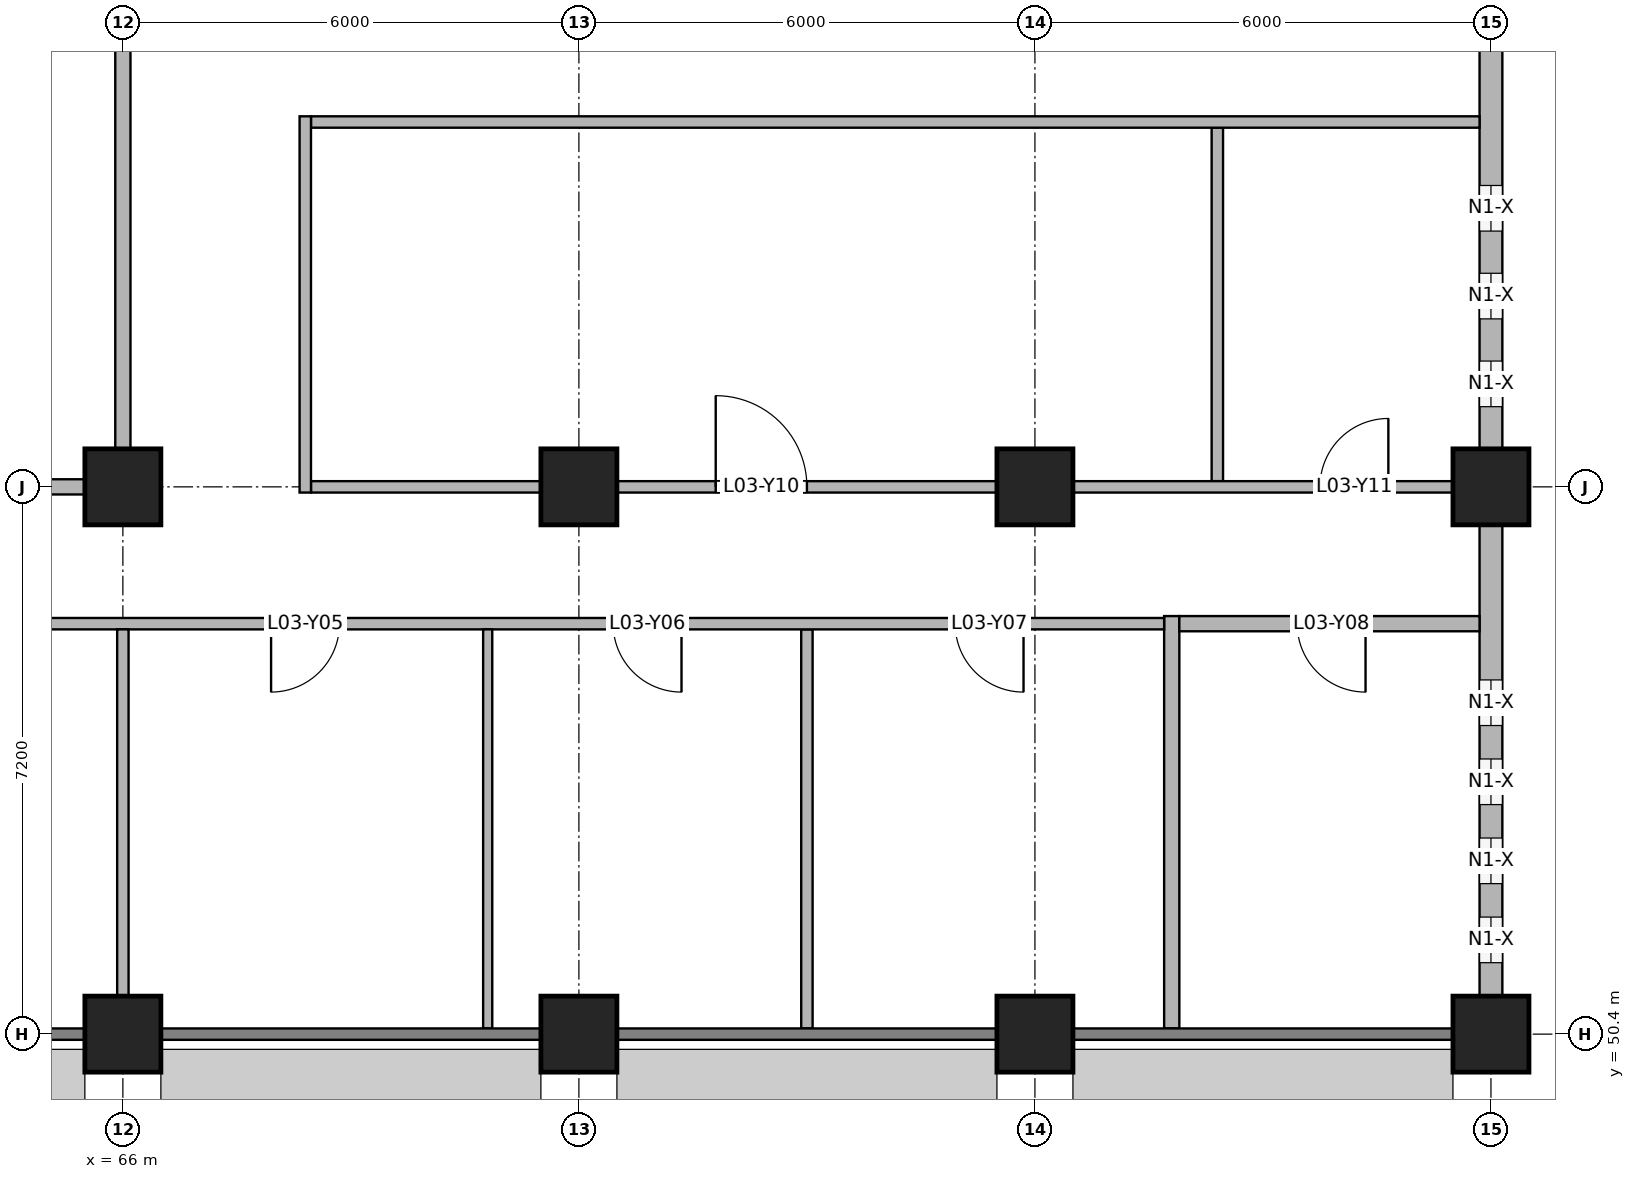
"""IFC4 building model, lengths in metres.
Left out: names, types, materials, properties, quantities, classifications, styles, units other than length and angle.
Written with IfcOpenShell. Run it as: python <this file> out.ifc"""

import sys

from ifc_helpers import new_model, si_unit, direction, frame, frame_2d, origin, origin_2d, place, context, subcontext, project, spatial, rectangle, extrude, element, fill, save


model = new_model("IFC4")
c1 = context("Model", 3, precision=1e-05, world=origin(), true_north=direction((0.0, 1.0)))
c2 = subcontext(c1, "Body", "Model", "MODEL_VIEW")
j1 = project(units=[si_unit("LENGTHUNIT", "METRE"), si_unit("PLANEANGLEUNIT", "RADIAN")], contexts=[c1])
p1 = place(None, origin())
s1 = spatial("IfcSite", under=j1, at=p1, CompositionType="ELEMENT")
p2 = place(p1, origin())
s2 = spatial("IfcBuilding", under=s1, at=p2, CompositionType="ELEMENT")
p3 = place(p2, frame((0.0, 0.0, 12.6)))
s3 = spatial("IfcBuildingStorey", under=s2, at=p3, CompositionType="ELEMENT", Elevation=12.6)
for number, where, z_axis, x_axis in (
    (1, (66.0, 50.4, 0.0), (0.0, 0.0, 1.0), (1.0, 0.0, 0.0)),
    (2, (72.0, 50.4, 0.0), (0.0, 0.0, 1.0), (1.0, 0.0, 0.0)),
    (3, (78.0, 50.4, 0.0), (0.0, 0.0, 1.0), (1.0, 0.0, 0.0)),
    (4, (84.0, 50.4, 0.0), (0.0, 0.0, 1.0), (1.0, 0.0, 0.0)),
    (5, (66.0, 57.6, 0.0), (0.0, 0.0, 1.0), (1.0, 0.0, 0.0)),
    (6, (72.0, 57.6, 0.0), (0.0, 0.0, 1.0), (1.0, 0.0, 0.0)),
    (7, (78.0, 57.6, 0.0), (0.0, 0.0, 1.0), (1.0, 0.0, 0.0)),
    (8, (84.0, 57.6, 0.0), (0.0, 0.0, 1.0), (1.0, 0.0, 0.0)),
):
    element("IfcColumn", number, at=place(p3, frame(where, z_axis=z_axis, x_axis=x_axis)), inside=s3, PredefinedType="COLUMN", context=c2, shape_type="SweptSolid", body=[
        extrude(rectangle(XDim=1.0, YDim=1.0, at=origin_2d()), origin(), (0.0, 0.0, 1.0), 4.0),
    ])
p4 = place(p3, frame((84.0, 50.9, 0.0), z_axis=(0.0, 0.0, 1.0), x_axis=(0.0, 1.0, 0.0)))
e9 = element("IfcWall", 9, at=p4, inside=s3, PredefinedType="SOLIDWALL", context=c2, shape_type="SweptSolid", body=[
    extrude(rectangle(XDim=6.2, YDim=0.3, at=frame_2d((3.1, 0.0))), origin(), (0.0, 0.0, 1.0), 3.1),
])
p5 = place(p4, frame((0.44, 0.0, 0.9)))
e10 = element("IfcOpeningElement", 10, at=p5, cuts=e9, PredefinedType="OPENING", context=c2, shape_type="SweptSolid", body=[
    extrude(rectangle(XDim=0.6, YDim=1.9, at=frame_2d((0.3, 0.95))), frame((0.0, 0.16, 0.0), z_axis=(0.0, -1.0, 0.0), x_axis=(1.0, 0.0, 0.0)), (0.0, 0.0, 1.0), 0.32),
])
p6 = place(p4, frame((1.48, 0.0, 0.9)))
e11 = element("IfcOpeningElement", 11, at=p6, cuts=e9, PredefinedType="OPENING", context=c2, shape_type="SweptSolid", body=[
    extrude(rectangle(XDim=0.6, YDim=1.9, at=frame_2d((0.3, 0.95))), frame((0.0, 0.16, 0.0), z_axis=(0.0, -1.0, 0.0), x_axis=(1.0, 0.0, 0.0)), (0.0, 0.0, 1.0), 0.32),
])
p7 = place(p4, frame((2.52, 0.0, 0.9)))
e12 = element("IfcOpeningElement", 12, at=p7, cuts=e9, PredefinedType="OPENING", context=c2, shape_type="SweptSolid", body=[
    extrude(rectangle(XDim=0.6, YDim=1.9, at=frame_2d((0.3, 0.95))), frame((0.0, 0.16, 0.0), z_axis=(0.0, -1.0, 0.0), x_axis=(1.0, 0.0, 0.0)), (0.0, 0.0, 1.0), 0.32),
])
p8 = place(p4, frame((3.56, 0.0, 0.9)))
e13 = element("IfcOpeningElement", 13, at=p8, cuts=e9, PredefinedType="OPENING", context=c2, shape_type="SweptSolid", body=[
    extrude(rectangle(XDim=0.6, YDim=1.9, at=frame_2d((0.3, 0.95))), frame((0.0, 0.16, 0.0), z_axis=(0.0, -1.0, 0.0), x_axis=(1.0, 0.0, 0.0)), (0.0, 0.0, 1.0), 0.32),
])
p9 = place(p3, frame((84.0, 58.1, 0.0), z_axis=(0.0, 0.0, 1.0), x_axis=(0.0, 1.0, 0.0)))
e14 = element("IfcWall", 14, at=p9, inside=s3, PredefinedType="SOLIDWALL", context=c2, shape_type="SweptSolid", body=[
    extrude(rectangle(XDim=6.7, YDim=0.3, at=frame_2d((3.35, 0.0))), origin(), (0.0, 0.0, 1.0), 3.1),
])
p10 = place(p9, frame((0.555, 0.0, 0.9)))
e15 = element("IfcOpeningElement", 15, at=p10, cuts=e14, PredefinedType="OPENING", context=c2, shape_type="SweptSolid", body=[
    extrude(rectangle(XDim=0.6, YDim=1.9, at=frame_2d((0.3, 0.95))), frame((0.0, 0.16, 0.0), z_axis=(0.0, -1.0, 0.0), x_axis=(1.0, 0.0, 0.0)), (0.0, 0.0, 1.0), 0.32),
])
p11 = place(p9, frame((1.71, 0.0, 0.9)))
e16 = element("IfcOpeningElement", 16, at=p11, cuts=e14, PredefinedType="OPENING", context=c2, shape_type="SweptSolid", body=[
    extrude(rectangle(XDim=0.6, YDim=1.9, at=frame_2d((0.3, 0.95))), frame((0.0, 0.16, 0.0), z_axis=(0.0, -1.0, 0.0), x_axis=(1.0, 0.0, 0.0)), (0.0, 0.0, 1.0), 0.32),
])
p12 = place(p9, frame((2.865, 0.0, 0.9)))
e17 = element("IfcOpeningElement", 17, at=p12, cuts=e14, PredefinedType="OPENING", context=c2, shape_type="SweptSolid", body=[
    extrude(rectangle(XDim=0.6, YDim=1.9, at=frame_2d((0.3, 0.95))), frame((0.0, 0.16, 0.0), z_axis=(0.0, -1.0, 0.0), x_axis=(1.0, 0.0, 0.0)), (0.0, 0.0, 1.0), 0.32),
])
p13 = place(p9, frame((5.34, 0.0, 0.9)))
e18 = element("IfcOpeningElement", 18, at=p13, cuts=e14, PredefinedType="OPENING", context=c2, shape_type="SweptSolid", body=[
    extrude(rectangle(XDim=0.6, YDim=1.9, at=frame_2d((0.3, 0.95))), frame((0.0, 0.16, 0.0), z_axis=(0.0, -1.0, 0.0), x_axis=(1.0, 0.0, 0.0)), (0.0, 0.0, 1.0), 0.32),
])
p14 = place(p3, frame((66.0, 50.9, 0.0), z_axis=(0.0, 0.0, 1.0), x_axis=(0.0, 1.0, 0.0)))
e19 = element("IfcWall", 19, at=p14, inside=s3, PredefinedType="PARTITIONING", context=c2, shape_type="SweptSolid", body=[
    extrude(rectangle(XDim=4.825, YDim=0.15, at=frame_2d((2.413, 0.0))), origin(), (0.0, 0.0, 1.0), 3.1),
])
p15 = place(p3, frame((66.0, 58.1, 0.0), z_axis=(0.0, 0.0, 1.0), x_axis=(0.0, 1.0, 0.0)))
e20 = element("IfcWall", 20, at=p15, inside=s3, PredefinedType="PARTITIONING", context=c2, shape_type="SweptSolid", body=[
    extrude(rectangle(XDim=6.7, YDim=0.2, at=frame_2d((3.35, 0.0))), origin(), (0.0, 0.0, 1.0), 7.3),
])
p16 = place(p3, frame((68.4, 57.525, 0.0), z_axis=(0.0, 0.0, 1.0), x_axis=(0.0, 1.0, 0.0)))
e21 = element("IfcWall", 21, at=p16, inside=s3, PredefinedType="PARTITIONING", context=c2, shape_type="SweptSolid", body=[
    extrude(rectangle(XDim=4.95, YDim=0.15, at=frame_2d((2.475, 0.0))), origin(), (0.0, 0.0, 1.0), 3.2),
])
p17 = place(p3, frame((70.8, 50.475, 0.0), z_axis=(0.0, 0.0, 1.0), x_axis=(0.0, 1.0, 0.0)))
e22 = element("IfcWall", 22, at=p17, inside=s3, PredefinedType="PARTITIONING", context=c2, shape_type="SweptSolid", body=[
    extrude(rectangle(XDim=5.25, YDim=0.12, at=frame_2d((2.625, 0.0))), origin(), (0.0, 0.0, 1.0), 3.2),
])
p18 = place(p3, frame((75.0, 50.475, 0.0), z_axis=(0.0, 0.0, 1.0), x_axis=(0.0, 1.0, 0.0)))
e23 = element("IfcWall", 23, at=p18, inside=s3, PredefinedType="PARTITIONING", context=c2, shape_type="SweptSolid", body=[
    extrude(rectangle(XDim=5.25, YDim=0.15, at=frame_2d((2.625, 0.0))), origin(), (0.0, 0.0, 1.0), 3.2),
])
p19 = place(p3, frame((79.8, 50.475, 0.0), z_axis=(0.0, 0.0, 1.0), x_axis=(0.0, 1.0, 0.0)))
e24 = element("IfcWall", 24, at=p19, inside=s3, PredefinedType="PARTITIONING", context=c2, shape_type="SweptSolid", body=[
    extrude(rectangle(XDim=5.425, YDim=0.2, at=frame_2d((2.712, 0.0))), origin(), (0.0, 0.0, 1.0), 3.2),
])
p20 = place(p3, frame((80.4, 57.675, 0.0), z_axis=(0.0, 0.0, 1.0), x_axis=(0.0, 1.0, 0.0)))
e25 = element("IfcWall", 25, at=p20, inside=s3, PredefinedType="PARTITIONING", context=c2, shape_type="SweptSolid", body=[
    extrude(rectangle(XDim=4.65, YDim=0.15, at=frame_2d((2.325, 0.0))), origin(), (0.0, 0.0, 1.0), 3.2),
])
p21 = place(p3, frame((57.675, 55.8, 0.0), z_axis=(0.0, 0.0, 1.0), x_axis=(1.0, 0.0, 0.0)))
e26 = element("IfcWall", 26, at=p21, inside=s3, PredefinedType="PARTITIONING", context=c2, shape_type="SweptSolid", body=[
    extrude(rectangle(XDim=22.025, YDim=0.15, at=frame_2d((11.012, 0.0))), origin(), (0.0, 0.0, 1.0), 3.1),
])
p22 = place(p21, frame((3.525, 0.0, 0.0)))
e27 = element("IfcOpeningElement", 27, at=p22, cuts=e26, PredefinedType="OPENING", context=c2, shape_type="SweptSolid", body=[
    extrude(rectangle(XDim=1.2, YDim=2.1, at=frame_2d((0.6, 1.05))), frame((0.0, 0.085, 0.0), z_axis=(0.0, -1.0, 0.0), x_axis=(1.0, 0.0, 0.0)), (0.0, 0.0, 1.0), 0.17),
])
p23 = place(p21, frame((10.275, 0.0, 0.0)))
e28 = element("IfcOpeningElement", 28, at=p23, cuts=e26, PredefinedType="OPENING", context=c2, shape_type="SweptSolid", body=[
    extrude(rectangle(XDim=0.9, YDim=2.1, at=frame_2d((0.45, 1.05))), frame((0.0, 0.085, 0.0), z_axis=(0.0, -1.0, 0.0), x_axis=(1.0, 0.0, 0.0)), (0.0, 0.0, 1.0), 0.17),
])
p24 = place(p21, frame((14.775, 0.0, 0.0)))
e29 = element("IfcOpeningElement", 29, at=p24, cuts=e26, PredefinedType="OPENING", context=c2, shape_type="SweptSolid", body=[
    extrude(rectangle(XDim=0.9, YDim=2.1, at=frame_2d((0.45, 1.05))), frame((0.0, 0.085, 0.0), z_axis=(0.0, -1.0, 0.0), x_axis=(1.0, 0.0, 0.0)), (0.0, 0.0, 1.0), 0.17),
])
p25 = place(p21, frame((19.275, 0.0, 0.0)))
e30 = element("IfcOpeningElement", 30, at=p25, cuts=e26, PredefinedType="OPENING", context=c2, shape_type="SweptSolid", body=[
    extrude(rectangle(XDim=0.9, YDim=2.1, at=frame_2d((0.45, 1.05))), frame((0.0, 0.085, 0.0), z_axis=(0.0, -1.0, 0.0), x_axis=(1.0, 0.0, 0.0)), (0.0, 0.0, 1.0), 0.17),
])
p26 = place(p3, frame((79.9, 55.8, 0.0), z_axis=(0.0, 0.0, 1.0), x_axis=(1.0, 0.0, 0.0)))
e31 = element("IfcWall", 31, at=p26, inside=s3, PredefinedType="PARTITIONING", context=c2, shape_type="SweptSolid", body=[
    extrude(rectangle(XDim=3.95, YDim=0.2, at=frame_2d((1.975, 0.0))), origin(), (0.0, 0.0, 1.0), 3.1),
])
p27 = place(p26, frame((1.55, 0.0, 0.0)))
e32 = element("IfcOpeningElement", 32, at=p27, cuts=e31, PredefinedType="OPENING", context=c2, shape_type="SweptSolid", body=[
    extrude(rectangle(XDim=0.9, YDim=2.1, at=frame_2d((0.45, 1.05))), frame((0.0, 0.11, 0.0), z_axis=(0.0, -1.0, 0.0), x_axis=(1.0, 0.0, 0.0)), (0.0, 0.0, 1.0), 0.22),
])
p28 = place(p3, frame((60.5, 57.6, 0.0), z_axis=(0.0, 0.0, 1.0), x_axis=(1.0, 0.0, 0.0)))
e33 = element("IfcWall", 33, at=p28, inside=s3, PredefinedType="PARTITIONING", context=c2, shape_type="SweptSolid", body=[
    extrude(rectangle(XDim=5.0, YDim=0.2, at=frame_2d((2.5, 0.0))), origin(), (0.0, 0.0, 1.0), 3.2),
])
p29 = place(p3, frame((68.475, 57.6, 0.0), z_axis=(0.0, 0.0, 1.0), x_axis=(1.0, 0.0, 0.0)))
e34 = element("IfcWall", 34, at=p29, inside=s3, PredefinedType="PARTITIONING", context=c2, shape_type="SweptSolid", body=[
    extrude(rectangle(XDim=3.025, YDim=0.15, at=frame_2d((1.512, 0.0))), origin(), (0.0, 0.0, 1.0), 3.2),
])
p30 = place(p3, frame((72.5, 57.6, 0.0), z_axis=(0.0, 0.0, 1.0), x_axis=(1.0, 0.0, 0.0)))
e35 = element("IfcWall", 35, at=p30, inside=s3, PredefinedType="PARTITIONING", context=c2, shape_type="SweptSolid", body=[
    extrude(rectangle(XDim=5.0, YDim=0.15, at=frame_2d((2.5, 0.0))), origin(), (0.0, 0.0, 1.0), 3.2),
])
p31 = place(p30, frame((1.3, 0.0, 0.0)))
e36 = element("IfcOpeningElement", 36, at=p31, cuts=e35, PredefinedType="OPENING", context=c2, shape_type="SweptSolid", body=[
    extrude(rectangle(XDim=1.2, YDim=2.1, at=frame_2d((0.6, 1.05))), frame((0.0, 0.085, 0.0), z_axis=(0.0, -1.0, 0.0), x_axis=(1.0, 0.0, 0.0)), (0.0, 0.0, 1.0), 0.17),
])
p32 = place(p3, frame((78.5, 57.6, 0.0), z_axis=(0.0, 0.0, 1.0), x_axis=(1.0, 0.0, 0.0)))
e37 = element("IfcWall", 37, at=p32, inside=s3, PredefinedType="PARTITIONING", context=c2, shape_type="SweptSolid", body=[
    extrude(rectangle(XDim=5.0, YDim=0.15, at=frame_2d((2.5, 0.0))), origin(), (0.0, 0.0, 1.0), 3.2),
])
p33 = place(p32, frame((3.25, 0.0, 0.0)))
e38 = element("IfcOpeningElement", 38, at=p33, cuts=e37, PredefinedType="OPENING", context=c2, shape_type="SweptSolid", body=[
    extrude(rectangle(XDim=0.9, YDim=2.1, at=frame_2d((0.45, 1.05))), frame((0.0, 0.085, 0.0), z_axis=(0.0, -1.0, 0.0), x_axis=(1.0, 0.0, 0.0)), (0.0, 0.0, 1.0), 0.17),
])
p34 = place(p3, frame((68.475, 62.4, 0.0), z_axis=(0.0, 0.0, 1.0), x_axis=(1.0, 0.0, 0.0)))
e39 = element("IfcWall", 39, at=p34, inside=s3, PredefinedType="PARTITIONING", context=c2, shape_type="SweptSolid", body=[
    extrude(rectangle(XDim=15.375, YDim=0.15, at=frame_2d((7.688, 0.0))), origin(), (0.0, 0.0, 1.0), 4.0),
])
p35 = place(p5, origin())
e40 = element("IfcWindow", 40, at=p35, inside=s3, PartitioningType="SINGLE_PANEL", PredefinedType="WINDOW", context=c2, shape_type="SweptSolid", body=[
    extrude(rectangle(XDim=0.6, YDim=1.9, at=frame_2d((0.3, 0.95))), frame((0.0, 0.03, 0.0), z_axis=(0.0, -1.0, 0.0), x_axis=(1.0, 0.0, 0.0)), (0.0, 0.0, 1.0), 0.06),
])
fill(e10, e40)
p36 = place(p6, origin())
e41 = element("IfcWindow", 41, at=p36, inside=s3, PartitioningType="SINGLE_PANEL", PredefinedType="WINDOW", context=c2, shape_type="SweptSolid", body=[
    extrude(rectangle(XDim=0.6, YDim=1.9, at=frame_2d((0.3, 0.95))), frame((0.0, 0.03, 0.0), z_axis=(0.0, -1.0, 0.0), x_axis=(1.0, 0.0, 0.0)), (0.0, 0.0, 1.0), 0.06),
])
fill(e11, e41)
p37 = place(p7, origin())
e42 = element("IfcWindow", 42, at=p37, inside=s3, PartitioningType="SINGLE_PANEL", PredefinedType="WINDOW", context=c2, shape_type="SweptSolid", body=[
    extrude(rectangle(XDim=0.6, YDim=1.9, at=frame_2d((0.3, 0.95))), frame((0.0, 0.03, 0.0), z_axis=(0.0, -1.0, 0.0), x_axis=(1.0, 0.0, 0.0)), (0.0, 0.0, 1.0), 0.06),
])
fill(e12, e42)
p38 = place(p8, origin())
e43 = element("IfcWindow", 43, at=p38, inside=s3, PartitioningType="SINGLE_PANEL", PredefinedType="WINDOW", context=c2, shape_type="SweptSolid", body=[
    extrude(rectangle(XDim=0.6, YDim=1.9, at=frame_2d((0.3, 0.95))), frame((0.0, 0.03, 0.0), z_axis=(0.0, -1.0, 0.0), x_axis=(1.0, 0.0, 0.0)), (0.0, 0.0, 1.0), 0.06),
])
fill(e13, e43)
p39 = place(p10, origin())
e44 = element("IfcWindow", 44, at=p39, inside=s3, PartitioningType="SINGLE_PANEL", PredefinedType="WINDOW", context=c2, shape_type="SweptSolid", body=[
    extrude(rectangle(XDim=0.6, YDim=1.9, at=frame_2d((0.3, 0.95))), frame((0.0, 0.03, 0.0), z_axis=(0.0, -1.0, 0.0), x_axis=(1.0, 0.0, 0.0)), (0.0, 0.0, 1.0), 0.06),
])
fill(e15, e44)
p40 = place(p11, origin())
e45 = element("IfcWindow", 45, at=p40, inside=s3, PartitioningType="SINGLE_PANEL", PredefinedType="WINDOW", context=c2, shape_type="SweptSolid", body=[
    extrude(rectangle(XDim=0.6, YDim=1.9, at=frame_2d((0.3, 0.95))), frame((0.0, 0.03, 0.0), z_axis=(0.0, -1.0, 0.0), x_axis=(1.0, 0.0, 0.0)), (0.0, 0.0, 1.0), 0.06),
])
fill(e16, e45)
p41 = place(p12, origin())
e46 = element("IfcWindow", 46, at=p41, inside=s3, PartitioningType="SINGLE_PANEL", PredefinedType="WINDOW", context=c2, shape_type="SweptSolid", body=[
    extrude(rectangle(XDim=0.6, YDim=1.9, at=frame_2d((0.3, 0.95))), frame((0.0, 0.03, 0.0), z_axis=(0.0, -1.0, 0.0), x_axis=(1.0, 0.0, 0.0)), (0.0, 0.0, 1.0), 0.06),
])
fill(e17, e46)
p42 = place(p23, frame((0.9, 0.0, 0.0), z_axis=(0.0, 0.0, 1.0), x_axis=(-1.0, 0.0, 0.0)))
e47 = element("IfcDoor", 47, at=p42, inside=s3, OperationType="SINGLE_SWING_RIGHT", PredefinedType="DOOR", context=c2, shape_type="SweptSolid", body=[
    extrude(rectangle(XDim=0.9, YDim=2.1, at=frame_2d((0.45, 1.05))), frame((0.0, 0.025, 0.0), z_axis=(0.0, -1.0, 0.0), x_axis=(1.0, 0.0, 0.0)), (0.0, 0.0, 1.0), 0.05),
])
fill(e28, e47)
p43 = place(p24, frame((0.9, 0.0, 0.0), z_axis=(0.0, 0.0, 1.0), x_axis=(-1.0, 0.0, 0.0)))
e48 = element("IfcDoor", 48, at=p43, inside=s3, OperationType="SINGLE_SWING_LEFT", PredefinedType="DOOR", context=c2, shape_type="SweptSolid", body=[
    extrude(rectangle(XDim=0.9, YDim=2.1, at=frame_2d((0.45, 1.05))), frame((0.0, 0.025, 0.0), z_axis=(0.0, -1.0, 0.0), x_axis=(1.0, 0.0, 0.0)), (0.0, 0.0, 1.0), 0.05),
])
fill(e29, e48)
p44 = place(p25, frame((0.9, 0.0, 0.0), z_axis=(0.0, 0.0, 1.0), x_axis=(-1.0, 0.0, 0.0)))
e49 = element("IfcDoor", 49, at=p44, inside=s3, OperationType="SINGLE_SWING_LEFT", PredefinedType="DOOR", context=c2, shape_type="SweptSolid", body=[
    extrude(rectangle(XDim=0.9, YDim=2.1, at=frame_2d((0.45, 1.05))), frame((0.0, 0.025, 0.0), z_axis=(0.0, -1.0, 0.0), x_axis=(1.0, 0.0, 0.0)), (0.0, 0.0, 1.0), 0.05),
])
fill(e30, e49)
p45 = place(p27, frame((0.9, 0.0, 0.0), z_axis=(0.0, 0.0, 1.0), x_axis=(-1.0, 0.0, 0.0)))
e50 = element("IfcDoor", 50, at=p45, inside=s3, OperationType="SINGLE_SWING_LEFT", PredefinedType="DOOR", context=c2, shape_type="SweptSolid", body=[
    extrude(rectangle(XDim=0.9, YDim=2.1, at=frame_2d((0.45, 1.05))), frame((0.0, 0.025, 0.0), z_axis=(0.0, -1.0, 0.0), x_axis=(1.0, 0.0, 0.0)), (0.0, 0.0, 1.0), 0.05),
])
fill(e32, e50)
p46 = place(p31, origin())
e51 = element("IfcDoor", 51, at=p46, inside=s3, OperationType="SINGLE_SWING_LEFT", PredefinedType="DOOR", context=c2, shape_type="SweptSolid", body=[
    extrude(rectangle(XDim=1.2, YDim=2.1, at=frame_2d((0.6, 1.05))), frame((0.0, 0.025, 0.0), z_axis=(0.0, -1.0, 0.0), x_axis=(1.0, 0.0, 0.0)), (0.0, 0.0, 1.0), 0.05),
])
fill(e36, e51)
p47 = place(p33, origin())
e52 = element("IfcDoor", 52, at=p47, inside=s3, OperationType="SINGLE_SWING_RIGHT", PredefinedType="DOOR", context=c2, shape_type="SweptSolid", body=[
    extrude(rectangle(XDim=0.9, YDim=2.1, at=frame_2d((0.45, 1.05))), frame((0.0, 0.025, 0.0), z_axis=(0.0, -1.0, 0.0), x_axis=(1.0, 0.0, 0.0)), (0.0, 0.0, 1.0), 0.05),
])
fill(e38, e52)
save(model, sys.argv[1])
